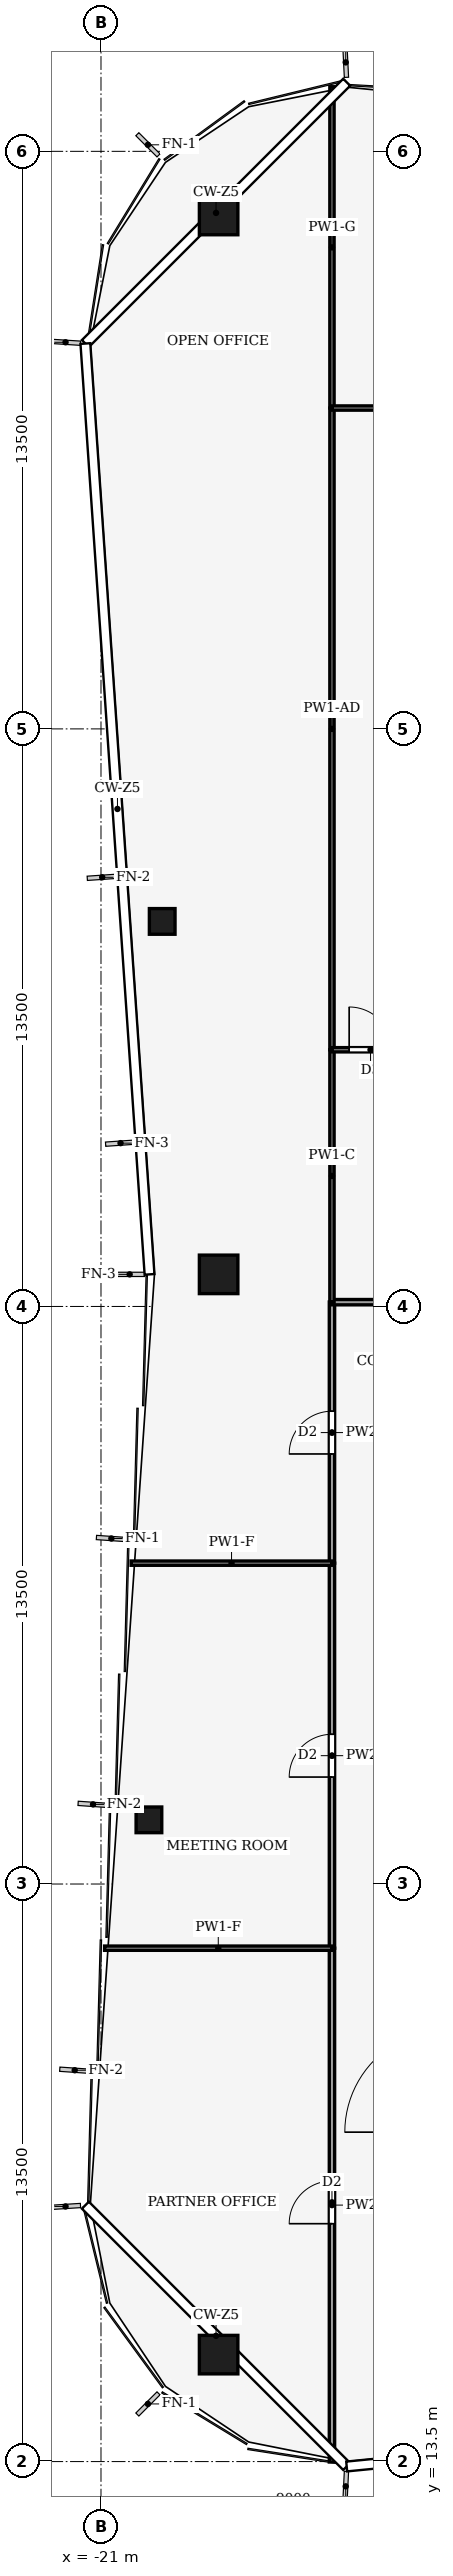
"""IFC4 building model, lengths in metres.
Left out: names, types, materials, properties, quantities, classifications, styles, units other than length and angle.
Written with IfcOpenShell. Run it as: python <this file> out.ifc"""

import sys

from ifc_helpers import new_model, si_unit, direction, frame, frame_2d, origin, origin_2d, place, context, subcontext, project, spatial, rectangle, hollow_rectangle, extrude, element, fill, save


model = new_model("IFC4")
c1 = context("Model", 3, precision=1e-05, world=origin(), true_north=direction((0.0, 1.0)))
c2 = subcontext(c1, "Body", "Model", "MODEL_VIEW")
j1 = project(units=[si_unit("LENGTHUNIT", "METRE"), si_unit("PLANEANGLEUNIT", "RADIAN")], contexts=[c1])
p1 = place(None, origin())
s1 = spatial("IfcSite", under=j1, at=p1, CompositionType="ELEMENT")
p2 = place(p1, origin())
s2 = spatial("IfcBuilding", under=s1, at=p2, CompositionType="ELEMENT")
p3 = place(p2, frame((0.0, 0.0, 306.0)))
s3 = spatial("IfcBuildingStorey", under=s2, at=p3, CompositionType="ELEMENT", Elevation=306.0)
for number, where, z_axis, x_axis in (
    (1, (-18.25, 66.0, 0.0), (0.0, 0.0, 1.0), (1.0, 0.0, 0.0)),
    (2, (-18.25, 16.0, 0.0), (0.0, 0.0, 1.0), (1.0, 0.0, 0.0)),
    (3, (-18.25, 41.25, 0.0), (0.0, 0.0, 1.0), (1.0, 0.0, 0.0)),
):
    element("IfcColumn", number, at=place(p3, frame(where, z_axis=z_axis, x_axis=x_axis)), inside=s3, PredefinedType="COLUMN", context=c2, shape_type="SweptSolid", body=[
        extrude(hollow_rectangle(XDim=0.9, YDim=0.9, WallThickness=0.04, at=origin_2d()), origin(), (0.0, 0.0, 1.0), 4.0),
    ])
for number, where, z_axis, x_axis in (
    (4, (-19.879, 28.5, 0.0), (0.0, 0.0, 1.0), (1.0, 0.0, 0.0)),
    (5, (-19.569, 49.5, 0.0), (0.0, 0.0, 1.0), (1.0, 0.0, 0.0)),
):
    element("IfcColumn", number, at=place(p3, frame(where, z_axis=z_axis, x_axis=x_axis)), inside=s3, PredefinedType="COLUMN", context=c2, shape_type="SweptSolid", body=[
        extrude(hollow_rectangle(XDim=0.6, YDim=0.6, WallThickness=0.025, at=origin_2d()), origin(), (0.0, 0.0, 1.0), 4.0),
    ])
p4 = place(p3, frame((-15.6, 13.49, 0.0), z_axis=(0.0, 0.0, 1.0), x_axis=(0.0, 1.0, 0.0)))
e6 = element("IfcWall", 6, at=p4, inside=s3, PredefinedType="PARTITIONING", context=c2, shape_type="SweptSolid", body=[
    extrude(rectangle(XDim=12.01, YDim=0.125, at=frame_2d((6.005, 0.0))), origin(), (0.0, 0.0, 1.0), 2.93),
])
p5 = place(p4, frame((5.571, 0.0, 0.0)))
e7 = element("IfcOpeningElement", 7, at=p5, cuts=e6, PredefinedType="OPENING", context=c2, shape_type="SweptSolid", body=[
    extrude(rectangle(XDim=1.0, YDim=2.1, at=frame_2d((0.5, 1.05))), frame((0.0, 0.073, 0.0), z_axis=(0.0, -1.0, 0.0), x_axis=(1.0, 0.0, 0.0)), (0.0, 0.0, 1.0), 0.145),
])
p6 = place(p3, frame((-15.6, 25.5, 0.0), z_axis=(0.0, 0.0, 1.0), x_axis=(0.0, 1.0, 0.0)))
e8 = element("IfcWall", 8, at=p6, inside=s3, PredefinedType="PARTITIONING", context=c2, shape_type="SweptSolid", body=[
    extrude(rectangle(XDim=9.0, YDim=0.125, at=frame_2d((4.5, 0.0))), origin(), (0.0, 0.0, 1.0), 3.54),
])
p7 = place(p6, frame((4.0, 0.0, 0.0)))
e9 = element("IfcOpeningElement", 9, at=p7, cuts=e8, PredefinedType="OPENING", context=c2, shape_type="SweptSolid", body=[
    extrude(rectangle(XDim=1.0, YDim=2.1, at=frame_2d((0.5, 1.05))), frame((0.0, 0.073, 0.0), z_axis=(0.0, -1.0, 0.0), x_axis=(1.0, 0.0, 0.0)), (0.0, 0.0, 1.0), 0.145),
])
p8 = place(p3, frame((-15.6, 34.5, 0.0), z_axis=(0.0, 0.0, 1.0), x_axis=(0.0, 1.0, 0.0)))
e10 = element("IfcWall", 10, at=p8, inside=s3, PredefinedType="PARTITIONING", context=c2, shape_type="SweptSolid", body=[
    extrude(rectangle(XDim=6.104, YDim=0.125, at=frame_2d((3.052, 0.0))), origin(), (0.0, 0.0, 1.0), 3.14),
])
p9 = place(p8, frame((2.552, 0.0, 0.0)))
e11 = element("IfcOpeningElement", 11, at=p9, cuts=e10, PredefinedType="OPENING", context=c2, shape_type="SweptSolid", body=[
    extrude(rectangle(XDim=1.0, YDim=2.1, at=frame_2d((0.5, 1.05))), frame((0.0, 0.073, 0.0), z_axis=(0.0, -1.0, 0.0), x_axis=(1.0, 0.0, 0.0)), (0.0, 0.0, 1.0), 0.145),
])
p10 = place(p3, frame((-15.6, 40.6, 0.0), z_axis=(0.0, 0.0, 1.0), x_axis=(1.0, 0.0, 0.0)))
e12 = element("IfcWall", 12, at=p10, inside=s3, PredefinedType="PARTITIONING", context=c2, shape_type="SweptSolid", body=[
    extrude(rectangle(XDim=6.6, YDim=0.125, at=frame_2d((3.3, 0.0))), origin(), (0.0, 0.0, 1.0), 3.39),
])
p11 = place(p10, frame((2.8, 0.0, 0.0)))
e13 = element("IfcOpeningElement", 13, at=p11, cuts=e12, PredefinedType="OPENING", context=c2, shape_type="SweptSolid", body=[
    extrude(rectangle(XDim=1.0, YDim=2.1, at=frame_2d((0.5, 1.05))), frame((0.0, 0.073, 0.0), z_axis=(0.0, -1.0, 0.0), x_axis=(1.0, 0.0, 0.0)), (0.0, 0.0, 1.0), 0.145),
])
p12 = place(p3, frame((-15.6, 25.5, 0.0), z_axis=(0.0, 0.0, 1.0), x_axis=(-1.0, 0.0, 0.0)))
e14 = element("IfcWall", 14, at=p12, inside=s3, PredefinedType="PARTITIONING", context=c2, shape_type="SweptSolid", body=[
    extrude(rectangle(XDim=5.316, YDim=0.1, at=frame_2d((2.658, 0.0))), origin(), (0.0, 0.0, 1.0), 3.04),
])
p13 = place(p3, frame((-15.6, 34.5, 0.0), z_axis=(0.0, 0.0, 1.0), x_axis=(-1.0, 0.0, 0.0)))
e15 = element("IfcWall", 15, at=p13, inside=s3, PredefinedType="PARTITIONING", context=c2, shape_type="SweptSolid", body=[
    extrude(rectangle(XDim=4.695, YDim=0.1, at=frame_2d((2.348, 0.0))), origin(), (0.0, 0.0, 1.0), 3.04),
])
p14 = place(p3, frame((-15.6, 40.6, 0.0), z_axis=(0.0, 0.0, 1.0), x_axis=(0.0, 1.0, 0.0)))
e16 = element("IfcWall", 16, at=p14, inside=s3, PredefinedType="PARTITIONING", context=c2, shape_type="SweptSolid", body=[
    extrude(rectangle(XDim=5.9, YDim=0.1, at=frame_2d((2.95, 0.0))), origin(), (0.0, 0.0, 1.0), 3.87),
])
p15 = place(p3, frame((-15.6, 46.5, 0.0), z_axis=(0.0, 0.0, 1.0), x_axis=(0.0, 1.0, 0.0)))
e17 = element("IfcWall", 17, at=p15, inside=s3, PredefinedType="PARTITIONING", context=c2, shape_type="SweptSolid", body=[
    extrude(rectangle(XDim=15.0, YDim=0.1, at=frame_2d((7.5, 0.0))), origin(), (0.0, 0.0, 1.0), 3.35),
])
p16 = place(p3, frame((-15.6, 61.5, 0.0), z_axis=(0.0, 0.0, 1.0), x_axis=(0.0, 1.0, 0.0)))
e18 = element("IfcWall", 18, at=p16, inside=s3, PredefinedType="PARTITIONING", context=c2, shape_type="SweptSolid", body=[
    extrude(rectangle(XDim=7.51, YDim=0.1, at=frame_2d((3.755, 0.0))), origin(), (0.0, 0.0, 1.0), 2.93),
])
p17 = place(p3, frame((-15.6, 46.5, 0.0), z_axis=(0.0, 0.0, 1.0), x_axis=(1.0, 0.0, 0.0)))
e19 = element("IfcWall", 19, at=p17, inside=s3, PredefinedType="PARTITIONING", context=c2, shape_type="SweptSolid", body=[
    extrude(rectangle(XDim=6.604, YDim=0.1, at=frame_2d((3.302, 0.0))), origin(), (0.0, 0.0, 1.0), 3.39),
])
p18 = place(p17, frame((0.402, 0.0, 0.0)))
e20 = element("IfcOpeningElement", 20, at=p18, cuts=e19, PredefinedType="OPENING", context=c2, shape_type="SweptSolid", body=[
    extrude(rectangle(XDim=1.0, YDim=2.1, at=frame_2d((0.5, 1.05))), frame((0.0, 0.06, 0.0), z_axis=(0.0, -1.0, 0.0), x_axis=(1.0, 0.0, 0.0)), (0.0, 0.0, 1.0), 0.12),
])
p19 = place(p3, frame((-15.6, 61.5, 0.0), z_axis=(0.0, 0.0, 1.0), x_axis=(1.0, 0.0, 0.0)))
e21 = element("IfcWall", 21, at=p19, inside=s3, PredefinedType="PARTITIONING", context=c2, shape_type="SweptSolid", body=[
    extrude(rectangle(XDim=9.6, YDim=0.1, at=frame_2d((4.8, 0.0))), origin(), (0.0, 0.0, 1.0), 3.24),
])
p20 = place(p19, frame((4.3, 0.0, 0.0)))
e22 = element("IfcOpeningElement", 22, at=p20, cuts=e21, PredefinedType="OPENING", context=c2, shape_type="SweptSolid", body=[
    extrude(rectangle(XDim=1.0, YDim=2.1, at=frame_2d((0.5, 1.05))), frame((0.0, 0.06, 0.0), z_axis=(0.0, -1.0, 0.0), x_axis=(1.0, 0.0, 0.0)), (0.0, 0.0, 1.0), 0.12),
])
p21 = place(p5, origin())
e23 = element("IfcDoor", 23, at=p21, inside=s3, OperationType="SINGLE_SWING_RIGHT", PredefinedType="DOOR", context=c2, shape_type="SweptSolid", body=[
    extrude(rectangle(XDim=1.0, YDim=2.1, at=frame_2d((0.5, 1.05))), frame((0.0, 0.025, 0.0), z_axis=(0.0, -1.0, 0.0), x_axis=(1.0, 0.0, 0.0)), (0.0, 0.0, 1.0), 0.05),
])
fill(e7, e23)
p22 = place(p7, origin())
e24 = element("IfcDoor", 24, at=p22, inside=s3, OperationType="SINGLE_SWING_RIGHT", PredefinedType="DOOR", context=c2, shape_type="SweptSolid", body=[
    extrude(rectangle(XDim=1.0, YDim=2.1, at=frame_2d((0.5, 1.05))), frame((0.0, 0.025, 0.0), z_axis=(0.0, -1.0, 0.0), x_axis=(1.0, 0.0, 0.0)), (0.0, 0.0, 1.0), 0.05),
])
fill(e9, e24)
p23 = place(p9, origin())
e25 = element("IfcDoor", 25, at=p23, inside=s3, OperationType="SINGLE_SWING_LEFT", PredefinedType="DOOR", context=c2, shape_type="SweptSolid", body=[
    extrude(rectangle(XDim=1.0, YDim=2.1, at=frame_2d((0.5, 1.05))), frame((0.0, 0.025, 0.0), z_axis=(0.0, -1.0, 0.0), x_axis=(1.0, 0.0, 0.0)), (0.0, 0.0, 1.0), 0.05),
])
fill(e11, e25)
p24 = place(p18, origin())
e26 = element("IfcDoor", 26, at=p24, inside=s3, OperationType="SINGLE_SWING_LEFT", PredefinedType="DOOR", context=c2, shape_type="SweptSolid", body=[
    extrude(rectangle(XDim=1.0, YDim=2.1, at=frame_2d((0.5, 1.05))), frame((0.0, 0.025, 0.0), z_axis=(0.0, -1.0, 0.0), x_axis=(1.0, 0.0, 0.0)), (0.0, 0.0, 1.0), 0.05),
])
fill(e20, e26)
save(model, sys.argv[1])
